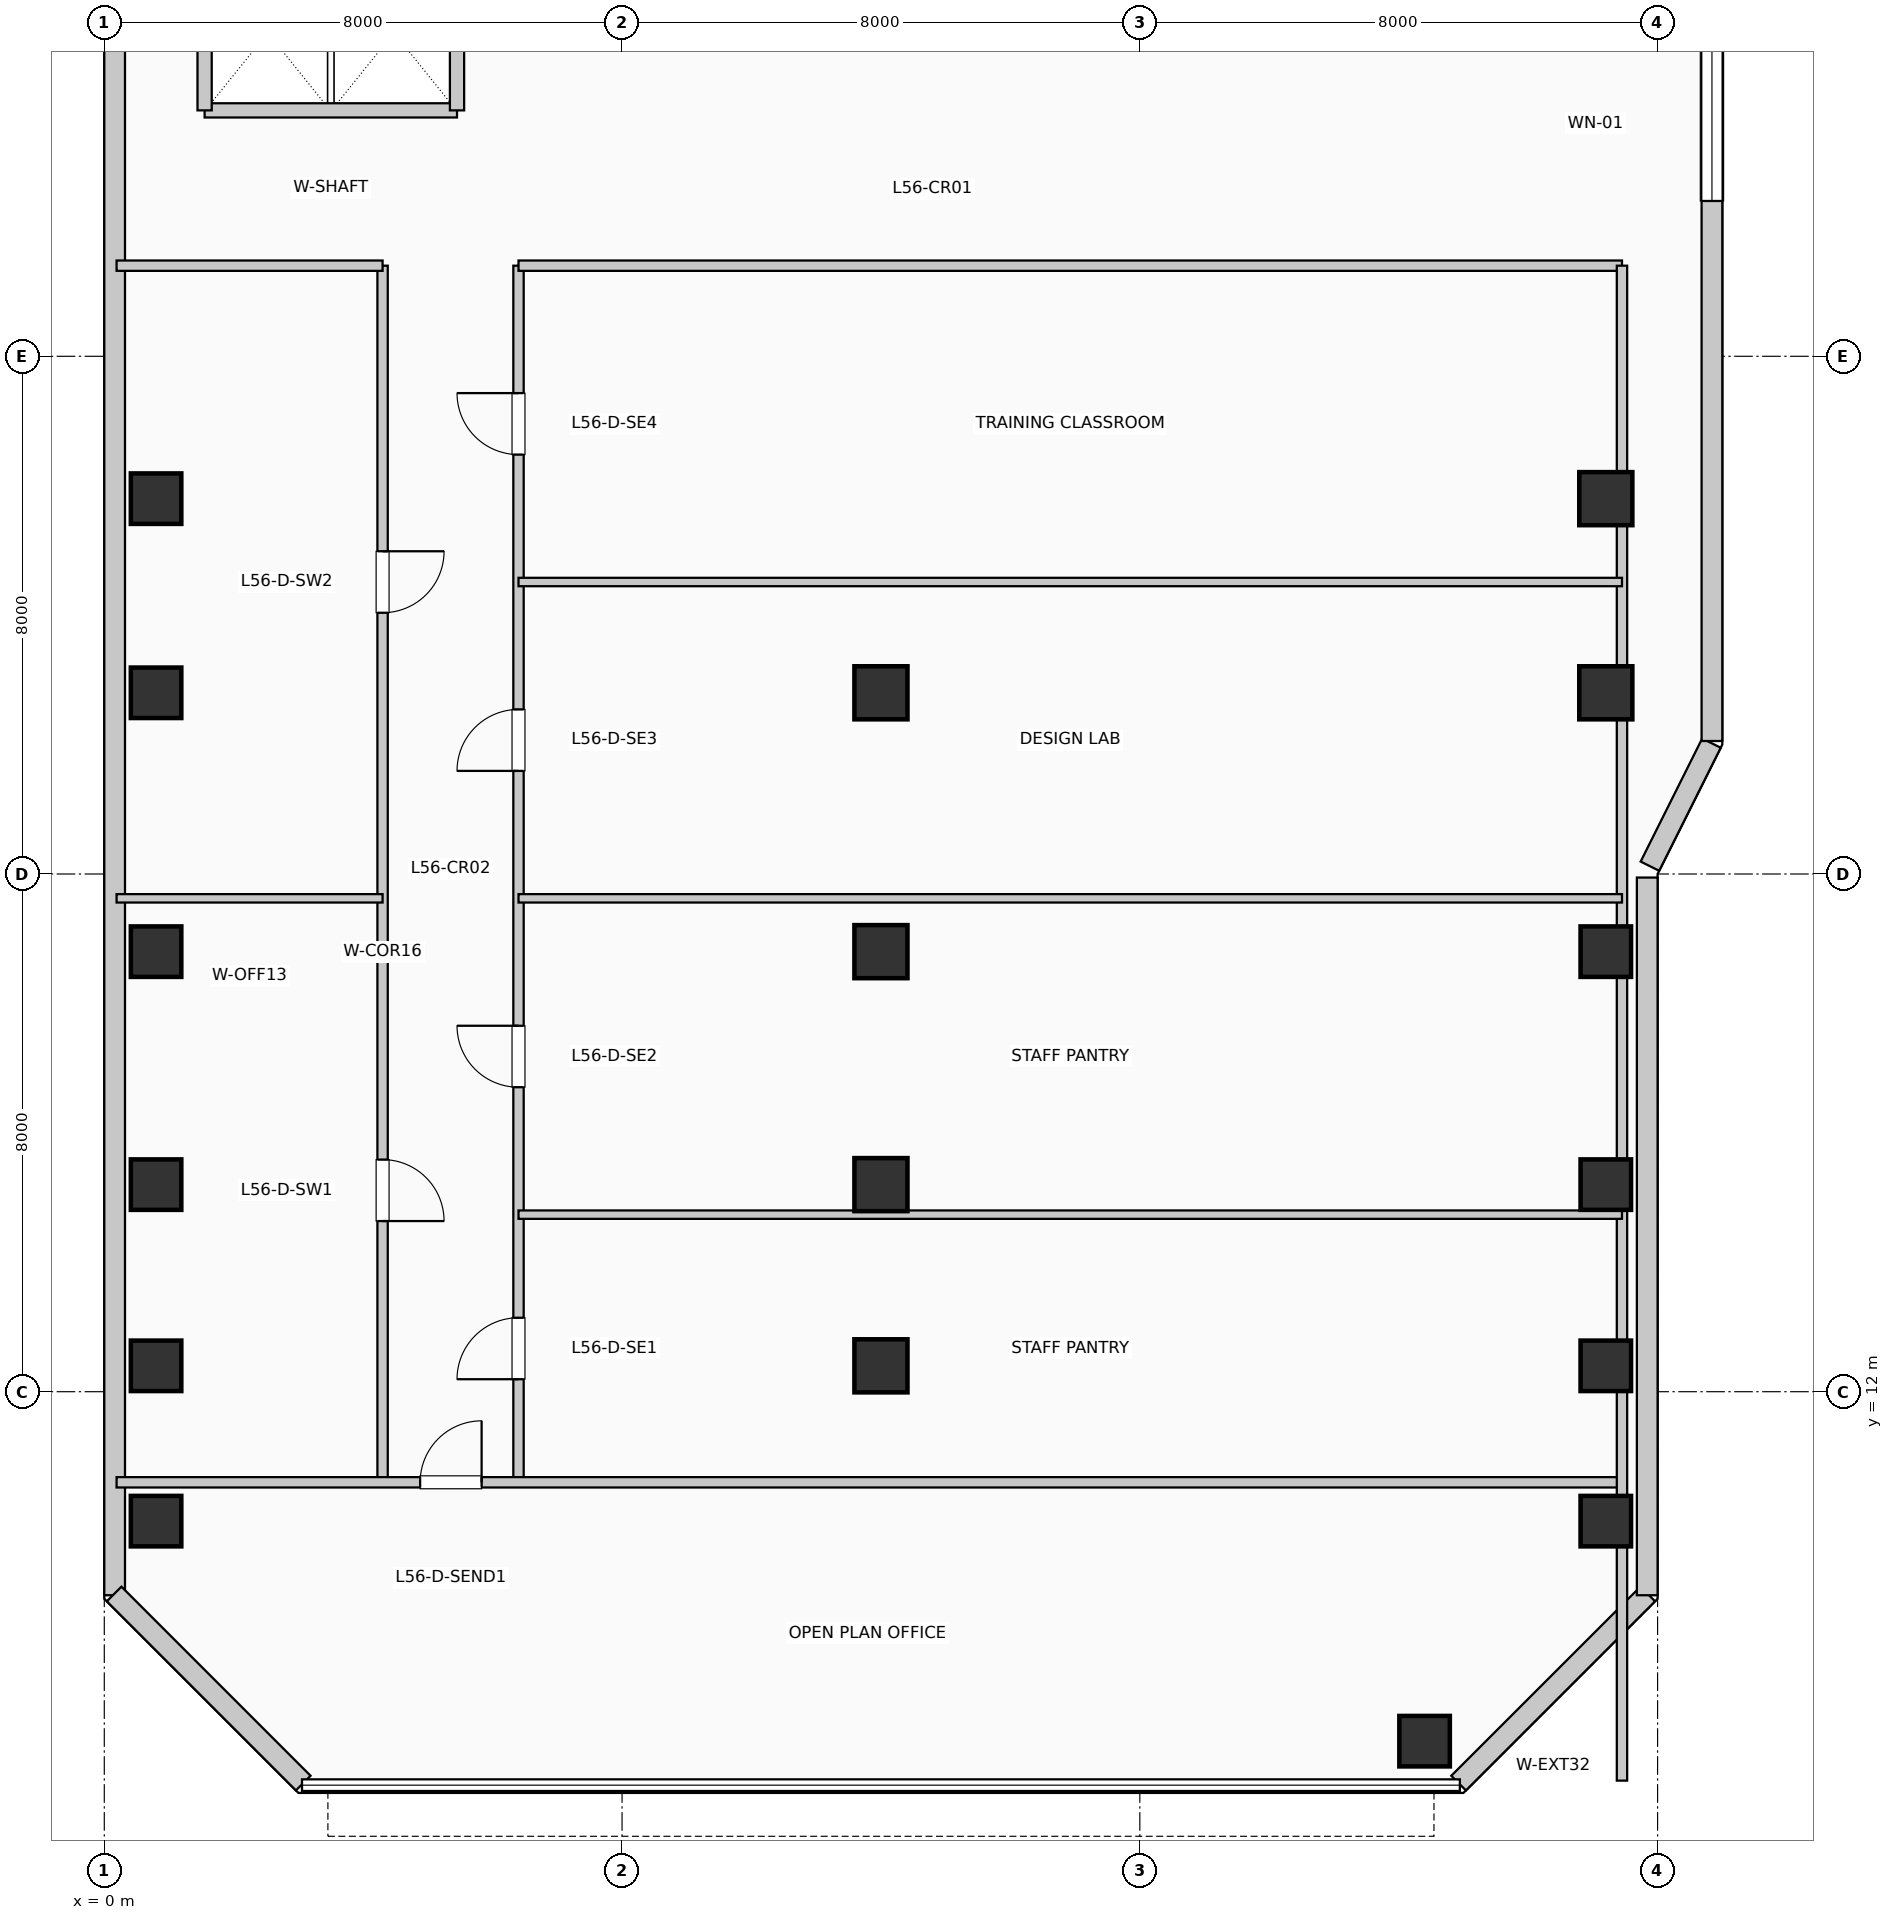
"""IFC4 building model, lengths in metres.
Left out: names, types, materials, properties, quantities, classifications, styles, units other than length and angle.
Written with IfcOpenShell. Run it as: python <this file> out.ifc"""

import sys

from ifc_helpers import new_model, si_unit, direction, frame, frame_2d, origin, origin_2d, place, context, subcontext, project, spatial, rectangle, extrude, element, fill, save


model = new_model("IFC4")
c1 = context("Model", 3, precision=1e-05, world=origin(), true_north=direction((0.0, 1.0)))
c2 = subcontext(c1, "Body", "Model", "MODEL_VIEW")
j1 = project(units=[si_unit("LENGTHUNIT", "METRE"), si_unit("PLANEANGLEUNIT", "RADIAN")], contexts=[c1])
p1 = place(None, origin())
s1 = spatial("IfcSite", under=j1, at=p1, CompositionType="ELEMENT")
p2 = place(p1, origin())
s2 = spatial("IfcBuilding", under=s1, at=p2, CompositionType="ELEMENT")
p3 = place(p2, frame((0.0, 0.0, 231.66)))
s3 = spatial("IfcBuildingStorey", under=s2, at=p3, CompositionType="ELEMENT", Elevation=231.66)
for number, where, z_axis, x_axis in (
    (1, (0.8, 10.0, 0.0), (0.0, 0.0, 1.0), (1.0, 0.0, 0.0)),
    (2, (0.8, 12.4, 0.0), (0.0, 0.0, 1.0), (1.0, 0.0, 0.0)),
    (3, (0.8, 15.2, 0.0), (0.0, 0.0, 1.0), (1.0, 0.0, 0.0)),
    (4, (0.8, 18.8, 0.0), (0.0, 0.0, 1.0), (1.0, 0.0, 0.0)),
    (5, (0.8, 22.8, 0.0), (0.0, 0.0, 1.0), (1.0, 0.0, 0.0)),
    (6, (0.8, 25.8, 0.0), (0.0, 0.0, 1.0), (1.0, 0.0, 0.0)),
):
    element("IfcColumn", number, at=place(p3, frame(where, z_axis=z_axis, x_axis=x_axis)), inside=s3, PredefinedType="COLUMN", context=c2, shape_type="SweptSolid", body=[
        extrude(rectangle(XDim=0.78, YDim=0.78, at=origin_2d()), origin(), (0.0, 0.0, 1.0), 3.96),
    ])
for number, where, z_axis, x_axis in (
    (7, (12.0, 12.4, 0.0), (0.0, 0.0, 1.0), (1.0, 0.0, 0.0)),
    (8, (12.0, 15.2, 0.0), (0.0, 0.0, 1.0), (1.0, 0.0, 0.0)),
    (9, (12.0, 18.8, 0.0), (0.0, 0.0, 1.0), (1.0, 0.0, 0.0)),
    (10, (12.0, 22.8, 0.0), (0.0, 0.0, 1.0), (1.0, 0.0, 0.0)),
):
    element("IfcColumn", number, at=place(p3, frame(where, z_axis=z_axis, x_axis=x_axis)), inside=s3, PredefinedType="COLUMN", context=c2, shape_type="SweptSolid", body=[
        extrude(rectangle(XDim=0.82, YDim=0.82, at=origin_2d()), origin(), (0.0, 0.0, 1.0), 3.96),
    ])
for number, where, z_axis, x_axis in (
    (11, (20.4, 6.6, 0.0), (0.0, 0.0, 1.0), (1.0, 0.0, 0.0)),
    (12, (23.2, 10.0, 0.0), (0.0, 0.0, 1.0), (1.0, 0.0, 0.0)),
    (13, (23.2, 12.4, 0.0), (0.0, 0.0, 1.0), (1.0, 0.0, 0.0)),
    (14, (23.2, 15.2, 0.0), (0.0, 0.0, 1.0), (1.0, 0.0, 0.0)),
    (15, (23.2, 18.8, 0.0), (0.0, 0.0, 1.0), (1.0, 0.0, 0.0)),
):
    element("IfcColumn", number, at=place(p3, frame(where, z_axis=z_axis, x_axis=x_axis)), inside=s3, PredefinedType="COLUMN", context=c2, shape_type="SweptSolid", body=[
        extrude(rectangle(XDim=0.78, YDim=0.78, at=origin_2d()), origin(), (0.0, 0.0, 1.0), 3.96),
    ])
for number, where, z_axis, x_axis in (
    (16, (23.2, 22.8, 0.0), (0.0, 0.0, 1.0), (1.0, 0.0, 0.0)),
    (17, (23.2, 25.8, 0.0), (0.0, 0.0, 1.0), (1.0, 0.0, 0.0)),
):
    element("IfcColumn", number, at=place(p3, frame(where, z_axis=z_axis, x_axis=x_axis)), inside=s3, PredefinedType="COLUMN", context=c2, shape_type="SweptSolid", body=[
        extrude(rectangle(XDim=0.82, YDim=0.82, at=origin_2d()), origin(), (0.0, 0.0, 1.0), 3.96),
    ])
p4 = place(p3, frame((20.926, 5.952, 0.0), z_axis=(0.0, 0.0, 1.0), x_axis=(0.707077242712, 0.707136318428, 0.0)))
e18 = element("IfcWall", 18, at=p4, inside=s3, PredefinedType="SOLIDWALL", context=c2, shape_type="SweptSolid", body=[
    extrude(rectangle(XDim=4.133, YDim=0.32, at=frame_2d((2.066, 0.0))), origin(), (0.0, 0.0, 1.0), 3.71),
])
p5 = place(p3, frame((23.84, 8.855, 0.0), z_axis=(0.0, 0.0, 1.0), x_axis=(0.0, 1.0, 0.0)))
e19 = element("IfcWall", 19, at=p5, inside=s3, PredefinedType="SOLIDWALL", context=c2, shape_type="SweptSolid", body=[
    extrude(rectangle(XDim=11.09, YDim=0.32, at=frame_2d((5.545, 0.0))), origin(), (0.0, 0.0, 1.0), 3.71),
])
p6 = place(p3, frame((23.882, 20.121, 0.0), z_axis=(0.0, 0.0, 1.0), x_axis=(0.447121734542, 0.894473115583, 0.0)))
e20 = element("IfcWall", 20, at=p6, inside=s3, PredefinedType="SOLIDWALL", context=c2, shape_type="SweptSolid", body=[
    extrude(rectangle(XDim=2.126, YDim=0.32, at=frame_2d((1.063, 0.0))), origin(), (0.0, 0.0, 1.0), 3.71),
])
p7 = place(p3, frame((24.84, 22.055, 0.0), z_axis=(0.0, 0.0, 1.0), x_axis=(0.0, 1.0, 0.0)))
e21 = element("IfcWall", 21, at=p7, inside=s3, PredefinedType="SOLIDWALL", context=c2, shape_type="SweptSolid", body=[
    extrude(rectangle(XDim=19.09, YDim=0.32, at=frame_2d((9.545, 0.0))), origin(), (0.0, 0.0, 1.0), 3.71),
])
p8 = place(p7, frame((8.345, 0.0, 0.85)))
e22 = element("IfcOpeningElement", 22, at=p8, cuts=e21, PredefinedType="OPENING", context=c2, shape_type="SweptSolid", body=[
    extrude(rectangle(XDim=2.4, YDim=2.05, at=frame_2d((1.2, 1.025))), frame((0.0, 0.17, 0.0), z_axis=(0.0, -1.0, 0.0), x_axis=(1.0, 0.0, 0.0)), (0.0, 0.0, 1.0), 0.34),
])
p9 = place(p3, frame((0.16, 34.395, 0.0), z_axis=(0.0, 0.0, 1.0), x_axis=(0.0, -1.0, 0.0)))
e23 = element("IfcWall", 23, at=p9, inside=s3, PredefinedType="SOLIDWALL", context=c2, shape_type="SweptSolid", body=[
    extrude(rectangle(XDim=25.54, YDim=0.32, at=frame_2d((12.77, 0.0))), origin(), (0.0, 0.0, 1.0), 3.71),
])
p10 = place(p3, frame((0.152, 8.874, 0.0), z_axis=(0.0, 0.0, 1.0), x_axis=(0.707077242712, -0.707136318428, 0.0)))
e24 = element("IfcWall", 24, at=p10, inside=s3, PredefinedType="SOLIDWALL", context=c2, shape_type="SweptSolid", body=[
    extrude(rectangle(XDim=4.133, YDim=0.32, at=frame_2d((2.066, 0.0))), origin(), (0.0, 0.0, 1.0), 3.71),
])
p11 = place(p3, frame((1.55, 31.8, 0.0), z_axis=(0.0, 0.0, 1.0), x_axis=(1.0, 0.0, 0.0)))
e25 = element("IfcWall", 25, at=p11, inside=s3, PredefinedType="PARTITIONING", context=c2, shape_type="SweptSolid", body=[
    extrude(rectangle(XDim=3.9, YDim=0.22, at=frame_2d((1.95, 0.0))), origin(), (0.0, 0.0, 1.0), 3.71),
])
for number, where, z_axis, x_axis in (
    (26, (1.55, 31.8, 0.0), (0.0, 0.0, 1.0), (0.0, 1.0, 0.0)),
    (27, (5.45, 31.8, 0.0), (0.0, 0.0, 1.0), (0.0, 1.0, 0.0)),
):
    element("IfcWall", number, at=place(p3, frame(where, z_axis=z_axis, x_axis=x_axis)), inside=s3, PredefinedType="PARTITIONING", context=c2, shape_type="SweptSolid", body=[
        extrude(rectangle(XDim=2.38, YDim=0.22, at=frame_2d((1.19, 0.0))), origin(), (0.0, 0.0, 1.0), 3.71),
    ])
p12 = place(p3, frame((4.3, 10.6, 0.0), z_axis=(0.0, 0.0, 1.0), x_axis=(0.0, 1.0, 0.0)))
e28 = element("IfcWall", 28, at=p12, inside=s3, PredefinedType="PARTITIONING", context=c2, shape_type="SweptSolid", body=[
    extrude(rectangle(XDim=18.8, YDim=0.16, at=frame_2d((9.4, 0.0))), origin(), (0.0, 0.0, 1.0), 3.71),
])
p13 = place(p12, frame((4.987, 0.0, 0.0), z_axis=(0.0, 0.0, 1.0), x_axis=(-1.0, 0.0, 0.0)))
e29 = element("IfcOpeningElement", 29, at=p13, cuts=e28, PredefinedType="OPENING", context=c2, shape_type="SweptSolid", body=[
    extrude(rectangle(XDim=0.95, YDim=2.15, at=frame_2d((0.475, 1.075))), frame((0.0, 0.09, 0.0), z_axis=(0.0, -1.0, 0.0), x_axis=(1.0, 0.0, 0.0)), (0.0, 0.0, 1.0), 0.18),
])
p14 = place(p12, frame((14.387, 0.0, 0.0), z_axis=(0.0, 0.0, 1.0), x_axis=(-1.0, 0.0, 0.0)))
e30 = element("IfcOpeningElement", 30, at=p14, cuts=e28, PredefinedType="OPENING", context=c2, shape_type="SweptSolid", body=[
    extrude(rectangle(XDim=0.95, YDim=2.15, at=frame_2d((0.475, 1.075))), frame((0.0, 0.09, 0.0), z_axis=(0.0, -1.0, 0.0), x_axis=(1.0, 0.0, 0.0)), (0.0, 0.0, 1.0), 0.18),
])
p15 = place(p3, frame((6.4, 10.6, 0.0), z_axis=(0.0, 0.0, 1.0), x_axis=(0.0, 1.0, 0.0)))
e31 = element("IfcWall", 31, at=p15, inside=s3, PredefinedType="PARTITIONING", context=c2, shape_type="SweptSolid", body=[
    extrude(rectangle(XDim=18.8, YDim=0.16, at=frame_2d((9.4, 0.0))), origin(), (0.0, 0.0, 1.0), 3.71),
])
p16 = place(p15, frame((1.593, 0.0, 0.0)))
e32 = element("IfcOpeningElement", 32, at=p16, cuts=e31, PredefinedType="OPENING", context=c2, shape_type="SweptSolid", body=[
    extrude(rectangle(XDim=0.95, YDim=2.15, at=frame_2d((0.475, 1.075))), frame((0.0, 0.09, 0.0), z_axis=(0.0, -1.0, 0.0), x_axis=(1.0, 0.0, 0.0)), (0.0, 0.0, 1.0), 0.18),
])
p17 = place(p15, frame((6.105, 0.0, 0.0)))
e33 = element("IfcOpeningElement", 33, at=p17, cuts=e31, PredefinedType="OPENING", context=c2, shape_type="SweptSolid", body=[
    extrude(rectangle(XDim=0.95, YDim=2.15, at=frame_2d((0.475, 1.075))), frame((0.0, 0.09, 0.0), z_axis=(0.0, -1.0, 0.0), x_axis=(1.0, 0.0, 0.0)), (0.0, 0.0, 1.0), 0.18),
])
p18 = place(p15, frame((10.993, 0.0, 0.0)))
e34 = element("IfcOpeningElement", 34, at=p18, cuts=e31, PredefinedType="OPENING", context=c2, shape_type="SweptSolid", body=[
    extrude(rectangle(XDim=0.95, YDim=2.15, at=frame_2d((0.475, 1.075))), frame((0.0, 0.09, 0.0), z_axis=(0.0, -1.0, 0.0), x_axis=(1.0, 0.0, 0.0)), (0.0, 0.0, 1.0), 0.18),
])
p19 = place(p15, frame((15.881, 0.0, 0.0)))
e35 = element("IfcOpeningElement", 35, at=p19, cuts=e31, PredefinedType="OPENING", context=c2, shape_type="SweptSolid", body=[
    extrude(rectangle(XDim=0.95, YDim=2.15, at=frame_2d((0.475, 1.075))), frame((0.0, 0.09, 0.0), z_axis=(0.0, -1.0, 0.0), x_axis=(1.0, 0.0, 0.0)), (0.0, 0.0, 1.0), 0.18),
])
p20 = place(p3, frame((0.19, 10.6, 0.0), z_axis=(0.0, 0.0, 1.0), x_axis=(1.0, 0.0, 0.0)))
e36 = element("IfcWall", 36, at=p20, inside=s3, PredefinedType="PARTITIONING", context=c2, shape_type="SweptSolid", body=[
    extrude(rectangle(XDim=23.26, YDim=0.16, at=frame_2d((11.63, 0.0))), origin(), (0.0, 0.0, 1.0), 3.71),
])
p21 = place(p20, frame((4.69, 0.0, 0.0)))
e37 = element("IfcOpeningElement", 37, at=p21, cuts=e36, PredefinedType="OPENING", context=c2, shape_type="SweptSolid", body=[
    extrude(rectangle(XDim=0.95, YDim=2.15, at=frame_2d((0.475, 1.075))), frame((0.0, 0.09, 0.0), z_axis=(0.0, -1.0, 0.0), x_axis=(1.0, 0.0, 0.0)), (0.0, 0.0, 1.0), 0.18),
])
p22 = place(p3, frame((0.19, 29.4, 0.0), z_axis=(0.0, 0.0, 1.0), x_axis=(1.0, 0.0, 0.0)))
e38 = element("IfcWall", 38, at=p22, inside=s3, PredefinedType="PARTITIONING", context=c2, shape_type="SweptSolid", body=[
    extrude(rectangle(XDim=4.11, YDim=0.16, at=frame_2d((2.055, 0.0))), origin(), (0.0, 0.0, 1.0), 3.365),
])
p23 = place(p3, frame((6.4, 29.4, 0.0), z_axis=(0.0, 0.0, 1.0), x_axis=(1.0, 0.0, 0.0)))
e39 = element("IfcWall", 39, at=p23, inside=s3, PredefinedType="PARTITIONING", context=c2, shape_type="SweptSolid", body=[
    extrude(rectangle(XDim=17.05, YDim=0.16, at=frame_2d((8.525, 0.0))), origin(), (0.0, 0.0, 1.0), 3.365),
])
p24 = place(p3, frame((23.45, 5.99, 0.0), z_axis=(0.0, 0.0, 1.0), x_axis=(0.0, 1.0, 0.0)))
e40 = element("IfcWall", 40, at=p24, inside=s3, PredefinedType="PARTITIONING", context=c2, shape_type="SweptSolid", body=[
    extrude(rectangle(XDim=23.41, YDim=0.16, at=frame_2d((11.705, 0.0))), origin(), (0.0, 0.0, 1.0), 3.095),
])
p25 = place(p3, frame((0.19, 19.624, 0.0), z_axis=(0.0, 0.0, 1.0), x_axis=(1.0, 0.0, 0.0)))
e41 = element("IfcWall", 41, at=p25, inside=s3, PredefinedType="PARTITIONING", context=c2, shape_type="SweptSolid", body=[
    extrude(rectangle(XDim=4.11, YDim=0.13, at=frame_2d((2.055, 0.0))), origin(), (0.0, 0.0, 1.0), 3.71),
])
p26 = place(p3, frame((6.4, 14.736, 0.0), z_axis=(0.0, 0.0, 1.0), x_axis=(1.0, 0.0, 0.0)))
e42 = element("IfcWall", 42, at=p26, inside=s3, PredefinedType="PARTITIONING", context=c2, shape_type="SweptSolid", body=[
    extrude(rectangle(XDim=17.05, YDim=0.13, at=frame_2d((8.525, 0.0))), origin(), (0.0, 0.0, 1.0), 3.095),
])
for number, where, z_axis, x_axis in (
    (43, (6.4, 19.624, 0.0), (0.0, 0.0, 1.0), (1.0, 0.0, 0.0)),
    (44, (6.4, 24.512, 0.0), (0.0, 0.0, 1.0), (1.0, 0.0, 0.0)),
):
    element("IfcWall", number, at=place(p3, frame(where, z_axis=z_axis, x_axis=x_axis)), inside=s3, PredefinedType="PARTITIONING", context=c2, shape_type="SweptSolid", body=[
        extrude(rectangle(XDim=17.05, YDim=0.13, at=frame_2d((8.525, 0.0))), origin(), (0.0, 0.0, 1.0), 3.71),
    ])
p27 = place(p8, origin())
e45 = element("IfcWindow", 45, at=p27, inside=s3, PartitioningType="SINGLE_PANEL", PredefinedType="WINDOW", context=c2, shape_type="SweptSolid", body=[
    extrude(rectangle(XDim=2.4, YDim=2.05, at=frame_2d((1.2, 1.025))), frame((0.0, 0.03, 0.0), z_axis=(0.0, -1.0, 0.0), x_axis=(1.0, 0.0, 0.0)), (0.0, 0.0, 1.0), 0.06),
])
fill(e22, e45)
p28 = place(p21, origin())
e46 = element("IfcDoor", 46, at=p28, inside=s3, OperationType="SINGLE_SWING_RIGHT", PredefinedType="DOOR", context=c2, shape_type="SweptSolid", body=[
    extrude(rectangle(XDim=0.95, YDim=2.15, at=frame_2d((0.475, 1.075))), frame((0.0, 0.025, 0.0), z_axis=(0.0, -1.0, 0.0), x_axis=(1.0, 0.0, 0.0)), (0.0, 0.0, 1.0), 0.05),
])
fill(e37, e46)
p29 = place(p13, origin())
e47 = element("IfcDoor", 47, at=p29, inside=s3, OperationType="SINGLE_SWING_LEFT", PredefinedType="DOOR", context=c2, shape_type="SweptSolid", body=[
    extrude(rectangle(XDim=0.95, YDim=2.15, at=frame_2d((0.475, 1.075))), frame((0.0, 0.025, 0.0), z_axis=(0.0, -1.0, 0.0), x_axis=(1.0, 0.0, 0.0)), (0.0, 0.0, 1.0), 0.05),
])
fill(e29, e47)
p30 = place(p14, origin())
e48 = element("IfcDoor", 48, at=p30, inside=s3, OperationType="SINGLE_SWING_RIGHT", PredefinedType="DOOR", context=c2, shape_type="SweptSolid", body=[
    extrude(rectangle(XDim=0.95, YDim=2.15, at=frame_2d((0.475, 1.075))), frame((0.0, 0.025, 0.0), z_axis=(0.0, -1.0, 0.0), x_axis=(1.0, 0.0, 0.0)), (0.0, 0.0, 1.0), 0.05),
])
fill(e30, e48)
p31 = place(p16, origin())
e49 = element("IfcDoor", 49, at=p31, inside=s3, OperationType="SINGLE_SWING_LEFT", PredefinedType="DOOR", context=c2, shape_type="SweptSolid", body=[
    extrude(rectangle(XDim=0.95, YDim=2.15, at=frame_2d((0.475, 1.075))), frame((0.0, 0.025, 0.0), z_axis=(0.0, -1.0, 0.0), x_axis=(1.0, 0.0, 0.0)), (0.0, 0.0, 1.0), 0.05),
])
fill(e32, e49)
p32 = place(p17, origin())
e50 = element("IfcDoor", 50, at=p32, inside=s3, OperationType="SINGLE_SWING_RIGHT", PredefinedType="DOOR", context=c2, shape_type="SweptSolid", body=[
    extrude(rectangle(XDim=0.95, YDim=2.15, at=frame_2d((0.475, 1.075))), frame((0.0, 0.025, 0.0), z_axis=(0.0, -1.0, 0.0), x_axis=(1.0, 0.0, 0.0)), (0.0, 0.0, 1.0), 0.05),
])
fill(e33, e50)
p33 = place(p18, origin())
e51 = element("IfcDoor", 51, at=p33, inside=s3, OperationType="SINGLE_SWING_LEFT", PredefinedType="DOOR", context=c2, shape_type="SweptSolid", body=[
    extrude(rectangle(XDim=0.95, YDim=2.15, at=frame_2d((0.475, 1.075))), frame((0.0, 0.025, 0.0), z_axis=(0.0, -1.0, 0.0), x_axis=(1.0, 0.0, 0.0)), (0.0, 0.0, 1.0), 0.05),
])
fill(e34, e51)
p34 = place(p19, origin())
e52 = element("IfcDoor", 52, at=p34, inside=s3, OperationType="SINGLE_SWING_RIGHT", PredefinedType="DOOR", context=c2, shape_type="SweptSolid", body=[
    extrude(rectangle(XDim=0.95, YDim=2.15, at=frame_2d((0.475, 1.075))), frame((0.0, 0.025, 0.0), z_axis=(0.0, -1.0, 0.0), x_axis=(1.0, 0.0, 0.0)), (0.0, 0.0, 1.0), 0.05),
])
fill(e35, e52)
save(model, sys.argv[1])
